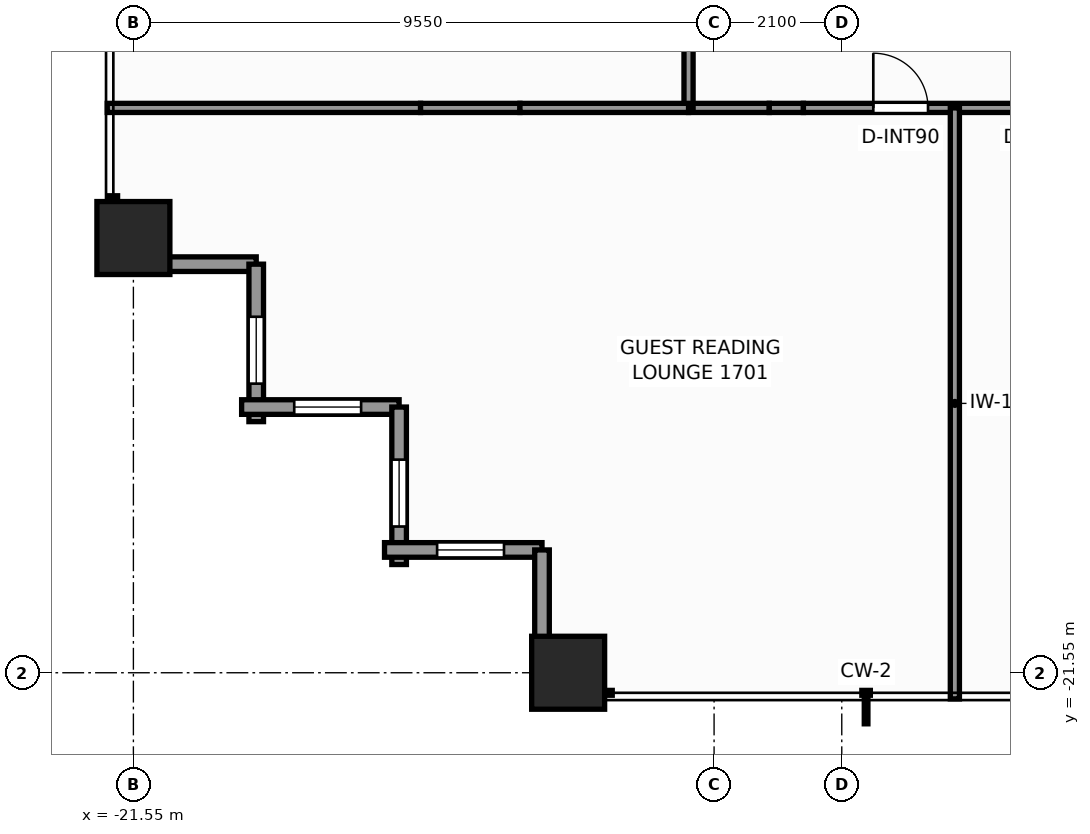
"""IFC4 building model, lengths in metres.
Left out: names, types, materials, properties, quantities, classifications, styles, units other than length and angle.
Written with IfcOpenShell. Run it as: python <this file> out.ifc"""

import sys

from ifc_helpers import new_model, si_unit, direction, frame, frame_2d, origin, origin_2d, place, context, subcontext, project, spatial, rectangle, extrude, element, fill, save


model = new_model("IFC4")
c1 = context("Model", 3, precision=1e-05, world=origin(), true_north=direction((0.0, 1.0)))
c2 = subcontext(c1, "Body", "Model", "MODEL_VIEW")
j1 = project(units=[si_unit("LENGTHUNIT", "METRE"), si_unit("PLANEANGLEUNIT", "RADIAN")], contexts=[c1])
p1 = place(None, origin())
s1 = spatial("IfcSite", under=j1, at=p1, CompositionType="ELEMENT")
p2 = place(p1, origin())
s2 = spatial("IfcBuilding", under=s1, at=p2, CompositionType="ELEMENT")
p3 = place(p2, frame((0.0, 0.0, 60.1)))
s3 = spatial("IfcBuildingStorey", under=s2, at=p3, CompositionType="ELEMENT", Elevation=60.1)
for number, where, z_axis, x_axis in (
    (1, (-14.4, -21.55, 0.0), (0.0, 0.0, 1.0), (1.0, 0.0, 0.0)),
    (2, (-21.55, -14.4, 0.0), (0.0, 0.0, 1.0), (1.0, 0.0, 0.0)),
):
    element("IfcColumn", number, at=place(p3, frame(where, z_axis=z_axis, x_axis=x_axis)), inside=s3, PredefinedType="COLUMN", context=c2, shape_type="SweptSolid", body=[
        extrude(rectangle(XDim=1.2, YDim=1.2, at=origin_2d()), origin(), (0.0, 0.0, 1.0), 3.3),
    ])
p4 = place(p3, frame((-19.53, -14.83, 0.0), z_axis=(0.0, 0.0, 1.0), x_axis=(-1.0, 0.0, 0.0)))
e3 = element("IfcWall", 3, at=p4, inside=s3, PredefinedType="STANDARD", context=c2, shape_type="SweptSolid", body=[
    extrude(rectangle(XDim=2.59, YDim=0.24, at=frame_2d((1.295, 0.0))), origin(), (0.0, 0.0, 1.0), 2.329),
])
p5 = place(p3, frame((-19.53, -17.42, 0.0), z_axis=(0.0, 0.0, 1.0), x_axis=(0.0, 1.0, 0.0)))
e4 = element("IfcWall", 4, at=p5, inside=s3, PredefinedType="STANDARD", context=c2, shape_type="SweptSolid", body=[
    extrude(rectangle(XDim=2.59, YDim=0.24, at=frame_2d((1.295, 0.0))), origin(), (0.0, 0.0, 1.0), 2.329),
])
p6 = place(p5, frame((0.625, 0.0, 0.65)))
e5 = element("IfcOpeningElement", 5, at=p6, cuts=e4, PredefinedType="OPENING", context=c2, shape_type="SweptSolid", body=[
    extrude(rectangle(XDim=1.1, YDim=1.45, at=frame_2d((0.55, 0.725))), frame((0.0, 0.13, 0.0), z_axis=(0.0, -1.0, 0.0), x_axis=(1.0, 0.0, 0.0)), (0.0, 0.0, 1.0), 0.26),
])
p7 = place(p3, frame((-17.18, -17.18, 0.0), z_axis=(0.0, 0.0, 1.0), x_axis=(-1.0, 0.0, 0.0)))
e6 = element("IfcWall", 6, at=p7, inside=s3, PredefinedType="STANDARD", context=c2, shape_type="SweptSolid", body=[
    extrude(rectangle(XDim=2.59, YDim=0.24, at=frame_2d((1.295, 0.0))), origin(), (0.0, 0.0, 1.0), 2.329),
])
p8 = place(p7, frame((0.625, 0.0, 0.65)))
e7 = element("IfcOpeningElement", 7, at=p8, cuts=e6, PredefinedType="OPENING", context=c2, shape_type="SweptSolid", body=[
    extrude(rectangle(XDim=1.1, YDim=1.45, at=frame_2d((0.55, 0.725))), frame((0.0, 0.13, 0.0), z_axis=(0.0, -1.0, 0.0), x_axis=(1.0, 0.0, 0.0)), (0.0, 0.0, 1.0), 0.26),
])
p9 = place(p3, frame((-17.18, -19.77, 0.0), z_axis=(0.0, 0.0, 1.0), x_axis=(0.0, 1.0, 0.0)))
e8 = element("IfcWall", 8, at=p9, inside=s3, PredefinedType="STANDARD", context=c2, shape_type="SweptSolid", body=[
    extrude(rectangle(XDim=2.59, YDim=0.24, at=frame_2d((1.295, 0.0))), origin(), (0.0, 0.0, 1.0), 2.329),
])
p10 = place(p9, frame((0.625, 0.0, 0.65)))
e9 = element("IfcOpeningElement", 9, at=p10, cuts=e8, PredefinedType="OPENING", context=c2, shape_type="SweptSolid", body=[
    extrude(rectangle(XDim=1.1, YDim=1.45, at=frame_2d((0.55, 0.725))), frame((0.0, 0.13, 0.0), z_axis=(0.0, -1.0, 0.0), x_axis=(1.0, 0.0, 0.0)), (0.0, 0.0, 1.0), 0.26),
])
p11 = place(p3, frame((-14.83, -19.53, 0.0), z_axis=(0.0, 0.0, 1.0), x_axis=(-1.0, 0.0, 0.0)))
e10 = element("IfcWall", 10, at=p11, inside=s3, PredefinedType="STANDARD", context=c2, shape_type="SweptSolid", body=[
    extrude(rectangle(XDim=2.59, YDim=0.24, at=frame_2d((1.295, 0.0))), origin(), (0.0, 0.0, 1.0), 2.329),
])
p12 = place(p11, frame((0.625, 0.0, 0.65)))
e11 = element("IfcOpeningElement", 11, at=p12, cuts=e10, PredefinedType="OPENING", context=c2, shape_type="SweptSolid", body=[
    extrude(rectangle(XDim=1.1, YDim=1.45, at=frame_2d((0.55, 0.725))), frame((0.0, 0.13, 0.0), z_axis=(0.0, -1.0, 0.0), x_axis=(1.0, 0.0, 0.0)), (0.0, 0.0, 1.0), 0.26),
])
p13 = place(p3, frame((-14.83, -22.12, 0.0), z_axis=(0.0, 0.0, 1.0), x_axis=(0.0, 1.0, 0.0)))
e12 = element("IfcWall", 12, at=p13, inside=s3, PredefinedType="STANDARD", context=c2, shape_type="SweptSolid", body=[
    extrude(rectangle(XDim=2.59, YDim=0.24, at=frame_2d((1.295, 0.0))), origin(), (0.0, 0.0, 1.0), 2.329),
])
p14 = place(p3, frame((-12.42, -12.26, 0.0), z_axis=(0.0, 0.0, 1.0), x_axis=(1.0, 0.0, 0.0)))
e13 = element("IfcWall", 13, at=p14, inside=s3, PredefinedType="PARTITIONING", context=c2, shape_type="SweptSolid", body=[
    extrude(rectangle(XDim=1.328, YDim=0.15, at=frame_2d((0.664, 0.0))), origin(), (0.0, 0.0, 1.0), 2.95),
])
p15 = place(p3, frame((-11.092, -12.26, 0.0), z_axis=(0.0, 0.0, 1.0), x_axis=(1.0, 0.0, 0.0)))
e14 = element("IfcWall", 14, at=p15, inside=s3, PredefinedType="PARTITIONING", context=c2, shape_type="SweptSolid", body=[
    extrude(rectangle(XDim=0.561, YDim=0.15, at=frame_2d((0.281, 0.0))), origin(), (0.0, 0.0, 1.0), 2.162),
])
p16 = place(p3, frame((-10.531, -12.26, 0.0), z_axis=(0.0, 0.0, 1.0), x_axis=(1.0, 0.0, 0.0)))
e15 = element("IfcWall", 15, at=p16, inside=s3, PredefinedType="PARTITIONING", context=c2, shape_type="SweptSolid", body=[
    extrude(rectangle(XDim=5.698, YDim=0.15, at=frame_2d((2.849, 0.0))), origin(), (0.0, 0.0, 1.0), 2.95),
])
p17 = place(p16, frame((1.149, 0.0, 0.0)))
e16 = element("IfcOpeningElement", 16, at=p17, cuts=e15, PredefinedType="OPENING", context=c2, shape_type="SweptSolid", body=[
    extrude(rectangle(XDim=0.9, YDim=2.06, at=frame_2d((0.45, 1.03))), frame((0.0, 0.085, 0.0), z_axis=(0.0, -1.0, 0.0), x_axis=(1.0, 0.0, 0.0)), (0.0, 0.0, 1.0), 0.17),
])
p18 = place(p16, frame((3.484, 0.0, 0.0)))
e17 = element("IfcOpeningElement", 17, at=p18, cuts=e15, PredefinedType="OPENING", context=c2, shape_type="SweptSolid", body=[
    extrude(rectangle(XDim=0.9, YDim=2.06, at=frame_2d((0.45, 1.03))), frame((0.0, 0.085, 0.0), z_axis=(0.0, -1.0, 0.0), x_axis=(1.0, 0.0, 0.0)), (0.0, 0.0, 1.0), 0.17),
])
p19 = place(p3, frame((-12.42, -12.26, 0.0), z_axis=(0.0, 0.0, 1.0), x_axis=(0.0, 1.0, 0.0)))
e18 = element("IfcWall", 18, at=p19, inside=s3, PredefinedType="PARTITIONING", context=c2, shape_type="SweptSolid", body=[
    extrude(rectangle(XDim=1.106, YDim=0.15, at=frame_2d((0.553, 0.0))), origin(), (0.0, 0.0, 1.0), 2.95),
])
p20 = place(p3, frame((-21.98, -12.26, 0.0), z_axis=(0.0, 0.0, 1.0), x_axis=(1.0, 0.0, 0.0)))
e19 = element("IfcWall", 19, at=p20, inside=s3, PredefinedType="PARTITIONING", context=c2, shape_type="SweptSolid", body=[
    extrude(rectangle(XDim=5.153, YDim=0.15, at=frame_2d((2.577, 0.0))), origin(), (0.0, 0.0, 1.0), 2.319),
])
p21 = place(p3, frame((-16.827, -12.26, 0.0), z_axis=(0.0, 0.0, 1.0), x_axis=(1.0, 0.0, 0.0)))
e20 = element("IfcWall", 20, at=p21, inside=s3, PredefinedType="PARTITIONING", context=c2, shape_type="SweptSolid", body=[
    extrude(rectangle(XDim=1.634, YDim=0.15, at=frame_2d((0.817, 0.0))), origin(), (0.0, 0.0, 1.0), 2.162),
])
p22 = place(p3, frame((-15.193, -12.26, 0.0), z_axis=(0.0, 0.0, 1.0), x_axis=(1.0, 0.0, 0.0)))
e21 = element("IfcWall", 21, at=p22, inside=s3, PredefinedType="PARTITIONING", context=c2, shape_type="SweptSolid", body=[
    extrude(rectangle(XDim=2.773, YDim=0.15, at=frame_2d((1.386, 0.0))), origin(), (0.0, 0.0, 1.0), 2.95),
])
p23 = place(p3, frame((-8.04, -21.98, 0.0), z_axis=(0.0, 0.0, 1.0), x_axis=(0.0, 1.0, 0.0)))
e22 = element("IfcWall", 22, at=p23, inside=s3, PredefinedType="PARTITIONING", context=c2, shape_type="SweptSolid", body=[
    extrude(rectangle(XDim=9.72, YDim=0.15, at=frame_2d((4.86, 0.0))), origin(), (0.0, 0.0, 1.0), 2.319),
])
p24 = place(p6, origin())
e23 = element("IfcWindow", 23, at=p24, inside=s3, PartitioningType="SINGLE_PANEL", PredefinedType="WINDOW", context=c2, shape_type="SweptSolid", body=[
    extrude(rectangle(XDim=1.1, YDim=1.45, at=frame_2d((0.55, 0.725))), frame((0.0, 0.03, 0.0), z_axis=(0.0, -1.0, 0.0), x_axis=(1.0, 0.0, 0.0)), (0.0, 0.0, 1.0), 0.06),
])
fill(e5, e23)
p25 = place(p8, origin())
e24 = element("IfcWindow", 24, at=p25, inside=s3, PartitioningType="SINGLE_PANEL", PredefinedType="WINDOW", context=c2, shape_type="SweptSolid", body=[
    extrude(rectangle(XDim=1.1, YDim=1.45, at=frame_2d((0.55, 0.725))), frame((0.0, 0.03, 0.0), z_axis=(0.0, -1.0, 0.0), x_axis=(1.0, 0.0, 0.0)), (0.0, 0.0, 1.0), 0.06),
])
fill(e7, e24)
p26 = place(p10, origin())
e25 = element("IfcWindow", 25, at=p26, inside=s3, PartitioningType="SINGLE_PANEL", PredefinedType="WINDOW", context=c2, shape_type="SweptSolid", body=[
    extrude(rectangle(XDim=1.1, YDim=1.45, at=frame_2d((0.55, 0.725))), frame((0.0, 0.03, 0.0), z_axis=(0.0, -1.0, 0.0), x_axis=(1.0, 0.0, 0.0)), (0.0, 0.0, 1.0), 0.06),
])
fill(e9, e25)
p27 = place(p12, origin())
e26 = element("IfcWindow", 26, at=p27, inside=s3, PartitioningType="SINGLE_PANEL", PredefinedType="WINDOW", context=c2, shape_type="SweptSolid", body=[
    extrude(rectangle(XDim=1.1, YDim=1.45, at=frame_2d((0.55, 0.725))), frame((0.0, 0.03, 0.0), z_axis=(0.0, -1.0, 0.0), x_axis=(1.0, 0.0, 0.0)), (0.0, 0.0, 1.0), 0.06),
])
fill(e11, e26)
p28 = place(p17, origin())
e27 = element("IfcDoor", 27, at=p28, inside=s3, OperationType="SINGLE_SWING_LEFT", PredefinedType="DOOR", context=c2, shape_type="SweptSolid", body=[
    extrude(rectangle(XDim=0.9, YDim=2.06, at=frame_2d((0.45, 1.03))), frame((0.0, 0.025, 0.0), z_axis=(0.0, -1.0, 0.0), x_axis=(1.0, 0.0, 0.0)), (0.0, 0.0, 1.0), 0.05),
])
fill(e16, e27)
save(model, sys.argv[1])
